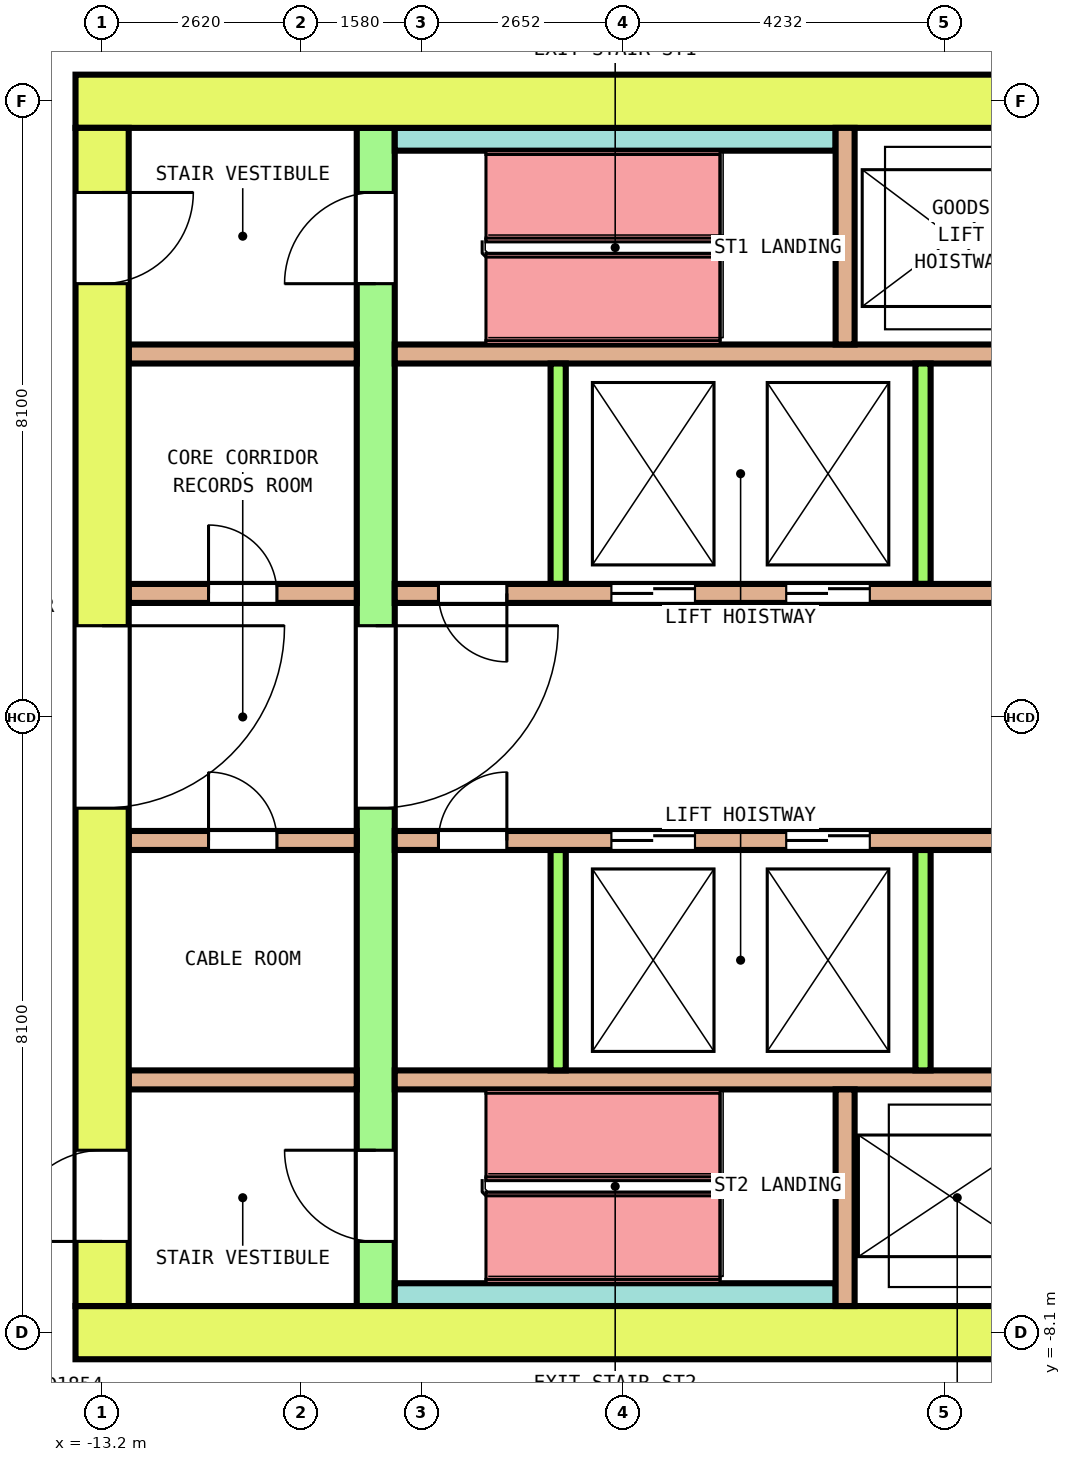
"""IFC4 building model, lengths in metres.
Left out: names, types, materials, properties, quantities, classifications, styles, units other than length and angle.
Written with IfcOpenShell. Run it as: python <this file> out.ifc"""

import sys

from ifc_helpers import new_model, si_unit, direction, frame, frame_2d, origin, place, context, subcontext, project, spatial, rectangle, extrude, element, fill, save


model = new_model("IFC4")
c1 = context("Model", 3, precision=1e-05, world=origin(), true_north=direction((0.0, 1.0)))
c2 = subcontext(c1, "Body", "Model", "MODEL_VIEW")
j1 = project(units=[si_unit("LENGTHUNIT", "METRE"), si_unit("PLANEANGLEUNIT", "RADIAN")], contexts=[c1])
p1 = place(None, origin())
s1 = spatial("IfcSite", under=j1, at=p1, CompositionType="ELEMENT")
p2 = place(p1, origin())
s2 = spatial("IfcBuilding", under=s1, at=p2, CompositionType="ELEMENT")
p3 = place(p2, frame((0.0, 0.0, 180.4)))
s3 = spatial("IfcBuildingStorey", under=s2, at=p3, CompositionType="ELEMENT", Elevation=180.4)
p4 = place(p3, frame((-13.55, 8.1, 0.0), z_axis=(0.0, 0.0, 1.0), x_axis=(1.0, 0.0, 0.0)))
e1 = element("IfcWall", 1, at=p4, inside=s3, PredefinedType="SHEAR", context=c2, shape_type="SweptSolid", body=[
    extrude(rectangle(XDim=27.1, YDim=0.7, at=frame_2d((13.55, 0.0))), origin(), (0.0, 0.0, 1.0), 4.1),
])
p5 = place(p4, frame((14.475, 0.0, 0.0)))
e2 = element("IfcOpeningElement", 2, at=p5, cuts=e1, PredefinedType="OPENING", context=c2, shape_type="SweptSolid", body=[
    extrude(rectangle(XDim=1.4, YDim=2.1, at=frame_2d((0.7, 1.05))), frame((0.0, 0.36, 0.0), z_axis=(0.0, -1.0, 0.0), x_axis=(1.0, 0.0, 0.0)), (0.0, 0.0, 1.0), 0.72),
])
p6 = place(p3, frame((-13.55, -8.1, 0.0), z_axis=(0.0, 0.0, 1.0), x_axis=(1.0, 0.0, 0.0)))
e3 = element("IfcWall", 3, at=p6, inside=s3, PredefinedType="SHEAR", context=c2, shape_type="SweptSolid", body=[
    extrude(rectangle(XDim=27.1, YDim=0.7, at=frame_2d((13.55, 0.0))), origin(), (0.0, 0.0, 1.0), 4.1),
])
p7 = place(p6, frame((15.1, 0.0, 0.0)))
e4 = element("IfcOpeningElement", 4, at=p7, cuts=e3, PredefinedType="OPENING", context=c2, shape_type="SweptSolid", body=[
    extrude(rectangle(XDim=1.2, YDim=2.1, at=frame_2d((0.6, 1.05))), frame((0.0, 0.36, 0.0), z_axis=(0.0, -1.0, 0.0), x_axis=(1.0, 0.0, 0.0)), (0.0, 0.0, 1.0), 0.72),
])
p8 = place(p3, frame((-13.2, -7.75, 0.0), z_axis=(0.0, 0.0, 1.0), x_axis=(0.0, 1.0, 0.0)))
e5 = element("IfcWall", 5, at=p8, inside=s3, PredefinedType="SHEAR", context=c2, shape_type="SweptSolid", body=[
    extrude(rectangle(XDim=15.5, YDim=0.7, at=frame_2d((7.75, 0.0))), origin(), (0.0, 0.0, 1.0), 4.1),
])
p9 = place(p8, frame((6.55, 0.0, 0.0)))
e6 = element("IfcOpeningElement", 6, at=p9, cuts=e5, PredefinedType="OPENING", context=c2, shape_type="SweptSolid", body=[
    extrude(rectangle(XDim=2.4, YDim=2.1, at=frame_2d((1.2, 1.05))), frame((0.0, 0.36, 0.0), z_axis=(0.0, -1.0, 0.0), x_axis=(1.0, 0.0, 0.0)), (0.0, 0.0, 1.0), 0.72),
])
p10 = place(p8, frame((13.45, 0.0, 0.0)))
e7 = element("IfcOpeningElement", 7, at=p10, cuts=e5, PredefinedType="OPENING", context=c2, shape_type="SweptSolid", body=[
    extrude(rectangle(XDim=1.2, YDim=2.1, at=frame_2d((0.6, 1.05))), frame((0.0, 0.36, 0.0), z_axis=(0.0, -1.0, 0.0), x_axis=(1.0, 0.0, 0.0)), (0.0, 0.0, 1.0), 0.72),
])
p11 = place(p8, frame((0.85, 0.0, 0.0)))
e8 = element("IfcOpeningElement", 8, at=p11, cuts=e5, PredefinedType="OPENING", context=c2, shape_type="SweptSolid", body=[
    extrude(rectangle(XDim=1.2, YDim=2.1, at=frame_2d((0.6, 1.05))), frame((0.0, 0.36, 0.0), z_axis=(0.0, -1.0, 0.0), x_axis=(1.0, 0.0, 0.0)), (0.0, 0.0, 1.0), 0.72),
])
p12 = place(p3, frame((-9.6, -7.75, 0.0), z_axis=(0.0, 0.0, 1.0), x_axis=(0.0, 1.0, 0.0)))
e9 = element("IfcWall", 9, at=p12, inside=s3, PredefinedType="SHEAR", context=c2, shape_type="SweptSolid", body=[
    extrude(rectangle(XDim=15.5, YDim=0.5, at=frame_2d((7.75, 0.0))), origin(), (0.0, 0.0, 1.0), 4.1),
])
p13 = place(p12, frame((6.55, 0.0, 0.0)))
e10 = element("IfcOpeningElement", 10, at=p13, cuts=e9, PredefinedType="OPENING", context=c2, shape_type="SweptSolid", body=[
    extrude(rectangle(XDim=2.4, YDim=2.1, at=frame_2d((1.2, 1.05))), frame((0.0, 0.26, 0.0), z_axis=(0.0, -1.0, 0.0), x_axis=(1.0, 0.0, 0.0)), (0.0, 0.0, 1.0), 0.52),
])
p14 = place(p12, frame((13.45, 0.0, 0.0)))
e11 = element("IfcOpeningElement", 11, at=p14, cuts=e9, PredefinedType="OPENING", context=c2, shape_type="SweptSolid", body=[
    extrude(rectangle(XDim=1.2, YDim=2.1, at=frame_2d((0.6, 1.05))), frame((0.0, 0.26, 0.0), z_axis=(0.0, -1.0, 0.0), x_axis=(1.0, 0.0, 0.0)), (0.0, 0.0, 1.0), 0.52),
])
p15 = place(p12, frame((0.85, 0.0, 0.0)))
e12 = element("IfcOpeningElement", 12, at=p15, cuts=e9, PredefinedType="OPENING", context=c2, shape_type="SweptSolid", body=[
    extrude(rectangle(XDim=1.2, YDim=2.1, at=frame_2d((0.6, 1.05))), frame((0.0, 0.26, 0.0), z_axis=(0.0, -1.0, 0.0), x_axis=(1.0, 0.0, 0.0)), (0.0, 0.0, 1.0), 0.52),
])
p16 = place(p3, frame((-12.85, 1.625, 0.0), z_axis=(0.0, 0.0, 1.0), x_axis=(1.0, 0.0, 0.0)))
e13 = element("IfcWall", 13, at=p16, inside=s3, PredefinedType="SOLIDWALL", context=c2, shape_type="SweptSolid", body=[
    extrude(rectangle(XDim=3.0, YDim=0.25, at=frame_2d((1.5, 0.0))), origin(), (0.0, 0.0, 1.0), 4.1),
])
p17 = place(p16, frame((1.05, 0.0, 0.0)))
e14 = element("IfcOpeningElement", 14, at=p17, cuts=e13, PredefinedType="OPENING", context=c2, shape_type="SweptSolid", body=[
    extrude(rectangle(XDim=0.9, YDim=2.1, at=frame_2d((0.45, 1.05))), frame((0.0, 0.135, 0.0), z_axis=(0.0, -1.0, 0.0), x_axis=(1.0, 0.0, 0.0)), (0.0, 0.0, 1.0), 0.27),
])
p18 = place(p3, frame((-9.35, 1.625, 0.0), z_axis=(0.0, 0.0, 1.0), x_axis=(1.0, 0.0, 0.0)))
e15 = element("IfcWall", 15, at=p18, inside=s3, PredefinedType="SOLIDWALL", context=c2, shape_type="SweptSolid", body=[
    extrude(rectangle(XDim=18.7, YDim=0.25, at=frame_2d((9.35, 0.0))), origin(), (0.0, 0.0, 1.0), 4.1),
])
p19 = place(p18, frame((2.85, 0.0, 0.0)))
e16 = element("IfcOpeningElement", 16, at=p19, cuts=e15, PredefinedType="OPENING", context=c2, shape_type="SweptSolid", body=[
    extrude(rectangle(XDim=1.1, YDim=2.1, at=frame_2d((0.55, 1.05))), frame((0.0, 0.135, 0.0), z_axis=(0.0, -1.0, 0.0), x_axis=(1.0, 0.0, 0.0)), (0.0, 0.0, 1.0), 0.27),
])
p20 = place(p18, frame((5.15, 0.0, 0.0)))
e17 = element("IfcOpeningElement", 17, at=p20, cuts=e15, PredefinedType="OPENING", context=c2, shape_type="SweptSolid", body=[
    extrude(rectangle(XDim=1.1, YDim=2.1, at=frame_2d((0.55, 1.05))), frame((0.0, 0.135, 0.0), z_axis=(0.0, -1.0, 0.0), x_axis=(1.0, 0.0, 0.0)), (0.0, 0.0, 1.0), 0.27),
])
p21 = place(p18, frame((14.8, 0.0, 0.0)))
e18 = element("IfcOpeningElement", 18, at=p21, cuts=e15, PredefinedType="OPENING", context=c2, shape_type="SweptSolid", body=[
    extrude(rectangle(XDim=1.1, YDim=2.1, at=frame_2d((0.55, 1.05))), frame((0.0, 0.135, 0.0), z_axis=(0.0, -1.0, 0.0), x_axis=(1.0, 0.0, 0.0)), (0.0, 0.0, 1.0), 0.27),
])
p22 = place(p18, frame((0.575, 0.0, 0.0)))
e19 = element("IfcOpeningElement", 19, at=p22, cuts=e15, PredefinedType="OPENING", context=c2, shape_type="SweptSolid", body=[
    extrude(rectangle(XDim=0.9, YDim=2.1, at=frame_2d((0.45, 1.05))), frame((0.0, 0.135, 0.0), z_axis=(0.0, -1.0, 0.0), x_axis=(1.0, 0.0, 0.0)), (0.0, 0.0, 1.0), 0.27),
])
p23 = place(p18, frame((17.225, 0.0, 0.0)))
e20 = element("IfcOpeningElement", 20, at=p23, cuts=e15, PredefinedType="OPENING", context=c2, shape_type="SweptSolid", body=[
    extrude(rectangle(XDim=0.9, YDim=2.1, at=frame_2d((0.45, 1.05))), frame((0.0, 0.135, 0.0), z_axis=(0.0, -1.0, 0.0), x_axis=(1.0, 0.0, 0.0)), (0.0, 0.0, 1.0), 0.27),
])
p24 = place(p3, frame((-12.85, 4.775, 0.0), z_axis=(0.0, 0.0, 1.0), x_axis=(1.0, 0.0, 0.0)))
e21 = element("IfcWall", 21, at=p24, inside=s3, PredefinedType="SOLIDWALL", context=c2, shape_type="SweptSolid", body=[
    extrude(rectangle(XDim=3.0, YDim=0.25, at=frame_2d((1.5, 0.0))), origin(), (0.0, 0.0, 1.0), 4.1),
])
p25 = place(p3, frame((-9.35, 4.775, 0.0), z_axis=(0.0, 0.0, 1.0), x_axis=(1.0, 0.0, 0.0)))
e22 = element("IfcWall", 22, at=p25, inside=s3, PredefinedType="SOLIDWALL", context=c2, shape_type="SweptSolid", body=[
    extrude(rectangle(XDim=18.7, YDim=0.25, at=frame_2d((9.35, 0.0))), origin(), (0.0, 0.0, 1.0), 4.1),
])
for number, where, z_axis, x_axis in (
    (23, (-7.2, 1.75, 0.0), (0.0, 0.0, 1.0), (0.0, 1.0, 0.0)),
    (24, (-2.4, 1.75, 0.0), (0.0, 0.0, 1.0), (0.0, 1.0, 0.0)),
):
    element("IfcWall", number, at=place(p3, frame(where, z_axis=z_axis, x_axis=x_axis)), inside=s3, PredefinedType="SOLIDWALL", context=c2, shape_type="SweptSolid", body=[
        extrude(rectangle(XDim=2.9, YDim=0.2, at=frame_2d((1.45, 0.0))), origin(), (0.0, 0.0, 1.0), 4.1),
    ])
p26 = place(p3, frame((-12.85, -1.625, 0.0), z_axis=(0.0, 0.0, 1.0), x_axis=(1.0, 0.0, 0.0)))
e25 = element("IfcWall", 25, at=p26, inside=s3, PredefinedType="SOLIDWALL", context=c2, shape_type="SweptSolid", body=[
    extrude(rectangle(XDim=3.0, YDim=0.25, at=frame_2d((1.5, 0.0))), origin(), (0.0, 0.0, 1.0), 4.1),
])
p27 = place(p26, frame((1.05, 0.0, 0.0)))
e26 = element("IfcOpeningElement", 26, at=p27, cuts=e25, PredefinedType="OPENING", context=c2, shape_type="SweptSolid", body=[
    extrude(rectangle(XDim=0.9, YDim=2.1, at=frame_2d((0.45, 1.05))), frame((0.0, 0.135, 0.0), z_axis=(0.0, -1.0, 0.0), x_axis=(1.0, 0.0, 0.0)), (0.0, 0.0, 1.0), 0.27),
])
p28 = place(p3, frame((-9.35, -1.625, 0.0), z_axis=(0.0, 0.0, 1.0), x_axis=(1.0, 0.0, 0.0)))
e27 = element("IfcWall", 27, at=p28, inside=s3, PredefinedType="SOLIDWALL", context=c2, shape_type="SweptSolid", body=[
    extrude(rectangle(XDim=18.7, YDim=0.25, at=frame_2d((9.35, 0.0))), origin(), (0.0, 0.0, 1.0), 4.1),
])
p29 = place(p28, frame((2.85, 0.0, 0.0)))
e28 = element("IfcOpeningElement", 28, at=p29, cuts=e27, PredefinedType="OPENING", context=c2, shape_type="SweptSolid", body=[
    extrude(rectangle(XDim=1.1, YDim=2.1, at=frame_2d((0.55, 1.05))), frame((0.0, 0.135, 0.0), z_axis=(0.0, -1.0, 0.0), x_axis=(1.0, 0.0, 0.0)), (0.0, 0.0, 1.0), 0.27),
])
p30 = place(p28, frame((5.15, 0.0, 0.0)))
e29 = element("IfcOpeningElement", 29, at=p30, cuts=e27, PredefinedType="OPENING", context=c2, shape_type="SweptSolid", body=[
    extrude(rectangle(XDim=1.1, YDim=2.1, at=frame_2d((0.55, 1.05))), frame((0.0, 0.135, 0.0), z_axis=(0.0, -1.0, 0.0), x_axis=(1.0, 0.0, 0.0)), (0.0, 0.0, 1.0), 0.27),
])
p31 = place(p28, frame((14.8, 0.0, 0.0)))
e30 = element("IfcOpeningElement", 30, at=p31, cuts=e27, PredefinedType="OPENING", context=c2, shape_type="SweptSolid", body=[
    extrude(rectangle(XDim=1.1, YDim=2.1, at=frame_2d((0.55, 1.05))), frame((0.0, 0.135, 0.0), z_axis=(0.0, -1.0, 0.0), x_axis=(1.0, 0.0, 0.0)), (0.0, 0.0, 1.0), 0.27),
])
p32 = place(p28, frame((0.575, 0.0, 0.0)))
e31 = element("IfcOpeningElement", 31, at=p32, cuts=e27, PredefinedType="OPENING", context=c2, shape_type="SweptSolid", body=[
    extrude(rectangle(XDim=0.9, YDim=2.1, at=frame_2d((0.45, 1.05))), frame((0.0, 0.135, 0.0), z_axis=(0.0, -1.0, 0.0), x_axis=(1.0, 0.0, 0.0)), (0.0, 0.0, 1.0), 0.27),
])
p33 = place(p28, frame((17.225, 0.0, 0.0)))
e32 = element("IfcOpeningElement", 32, at=p33, cuts=e27, PredefinedType="OPENING", context=c2, shape_type="SweptSolid", body=[
    extrude(rectangle(XDim=0.9, YDim=2.1, at=frame_2d((0.45, 1.05))), frame((0.0, 0.135, 0.0), z_axis=(0.0, -1.0, 0.0), x_axis=(1.0, 0.0, 0.0)), (0.0, 0.0, 1.0), 0.27),
])
p34 = place(p3, frame((-12.85, -4.775, 0.0), z_axis=(0.0, 0.0, 1.0), x_axis=(1.0, 0.0, 0.0)))
e33 = element("IfcWall", 33, at=p34, inside=s3, PredefinedType="SOLIDWALL", context=c2, shape_type="SweptSolid", body=[
    extrude(rectangle(XDim=3.0, YDim=0.25, at=frame_2d((1.5, 0.0))), origin(), (0.0, 0.0, 1.0), 4.1),
])
p35 = place(p3, frame((-9.35, -4.775, 0.0), z_axis=(0.0, 0.0, 1.0), x_axis=(1.0, 0.0, 0.0)))
e34 = element("IfcWall", 34, at=p35, inside=s3, PredefinedType="SOLIDWALL", context=c2, shape_type="SweptSolid", body=[
    extrude(rectangle(XDim=18.7, YDim=0.25, at=frame_2d((9.35, 0.0))), origin(), (0.0, 0.0, 1.0), 4.1),
])
for number, where, z_axis, x_axis in (
    (35, (-7.2, -4.65, 0.0), (0.0, 0.0, 1.0), (0.0, 1.0, 0.0)),
    (36, (-2.4, -4.65, 0.0), (0.0, 0.0, 1.0), (0.0, 1.0, 0.0)),
):
    element("IfcWall", number, at=place(p3, frame(where, z_axis=z_axis, x_axis=x_axis)), inside=s3, PredefinedType="SOLIDWALL", context=c2, shape_type="SweptSolid", body=[
        extrude(rectangle(XDim=2.9, YDim=0.2, at=frame_2d((1.45, 0.0))), origin(), (0.0, 0.0, 1.0), 4.1),
    ])
p36 = place(p3, frame((-9.35, 7.6, 0.0), z_axis=(0.0, 0.0, 1.0), x_axis=(1.0, 0.0, 0.0)))
e37 = element("IfcWall", 37, at=p36, inside=s3, PredefinedType="SOLIDWALL", context=c2, shape_type="SweptSolid", body=[
    extrude(rectangle(XDim=5.8, YDim=0.3, at=frame_2d((2.9, 0.0))), origin(), (0.0, 0.0, 1.0), 4.1),
])
p37 = place(p3, frame((-3.425, 4.9, 0.0), z_axis=(0.0, 0.0, 1.0), x_axis=(0.0, 1.0, 0.0)))
e38 = element("IfcWall", 38, at=p37, inside=s3, PredefinedType="SOLIDWALL", context=c2, shape_type="SweptSolid", body=[
    extrude(rectangle(XDim=2.85, YDim=0.25, at=frame_2d((1.425, 0.0))), origin(), (0.0, 0.0, 1.0), 4.1),
])
p38 = place(p3, frame((-9.35, -7.6, 0.0), z_axis=(0.0, 0.0, 1.0), x_axis=(1.0, 0.0, 0.0)))
e39 = element("IfcWall", 39, at=p38, inside=s3, PredefinedType="SOLIDWALL", context=c2, shape_type="SweptSolid", body=[
    extrude(rectangle(XDim=5.8, YDim=0.3, at=frame_2d((2.9, 0.0))), origin(), (0.0, 0.0, 1.0), 4.1),
])
p39 = place(p3, frame((-3.425, -7.75, 0.0), z_axis=(0.0, 0.0, 1.0), x_axis=(0.0, 1.0, 0.0)))
e40 = element("IfcWall", 40, at=p39, inside=s3, PredefinedType="SOLIDWALL", context=c2, shape_type="SweptSolid", body=[
    extrude(rectangle(XDim=2.85, YDim=0.25, at=frame_2d((1.425, 0.0))), origin(), (0.0, 0.0, 1.0), 4.1),
])
p40 = place(p19, origin())
e41 = element("IfcDoor", 41, at=p40, inside=s3, OperationType="DOUBLE_DOOR_SLIDING", PredefinedType="DOOR", context=c2, shape_type="SweptSolid", body=[
    extrude(rectangle(XDim=1.1, YDim=2.1, at=frame_2d((0.55, 1.05))), frame((0.0, 0.075, 0.0), z_axis=(0.0, -1.0, 0.0), x_axis=(1.0, 0.0, 0.0)), (0.0, 0.0, 1.0), 0.15),
])
fill(e16, e41)
p41 = place(p20, origin())
e42 = element("IfcDoor", 42, at=p41, inside=s3, OperationType="DOUBLE_DOOR_SLIDING", PredefinedType="DOOR", context=c2, shape_type="SweptSolid", body=[
    extrude(rectangle(XDim=1.1, YDim=2.1, at=frame_2d((0.55, 1.05))), frame((0.0, 0.075, 0.0), z_axis=(0.0, -1.0, 0.0), x_axis=(1.0, 0.0, 0.0)), (0.0, 0.0, 1.0), 0.15),
])
fill(e17, e42)
p42 = place(p29, origin())
e43 = element("IfcDoor", 43, at=p42, inside=s3, OperationType="DOUBLE_DOOR_SLIDING", PredefinedType="DOOR", context=c2, shape_type="SweptSolid", body=[
    extrude(rectangle(XDim=1.1, YDim=2.1, at=frame_2d((0.55, 1.05))), frame((0.0, 0.075, 0.0), z_axis=(0.0, -1.0, 0.0), x_axis=(1.0, 0.0, 0.0)), (0.0, 0.0, 1.0), 0.15),
])
fill(e28, e43)
p43 = place(p30, origin())
e44 = element("IfcDoor", 44, at=p43, inside=s3, OperationType="DOUBLE_DOOR_SLIDING", PredefinedType="DOOR", context=c2, shape_type="SweptSolid", body=[
    extrude(rectangle(XDim=1.1, YDim=2.1, at=frame_2d((0.55, 1.05))), frame((0.0, 0.075, 0.0), z_axis=(0.0, -1.0, 0.0), x_axis=(1.0, 0.0, 0.0)), (0.0, 0.0, 1.0), 0.15),
])
fill(e29, e44)
p44 = place(p13, origin())
e45 = element("IfcDoor", 45, at=p44, inside=s3, OperationType="DOUBLE_DOOR_SINGLE_SWING", PredefinedType="DOOR", context=c2, shape_type="SweptSolid", body=[
    extrude(rectangle(XDim=2.4, YDim=2.1, at=frame_2d((1.2, 1.05))), frame((0.0, 0.2, 0.0), z_axis=(0.0, -1.0, 0.0), x_axis=(1.0, 0.0, 0.0)), (0.0, 0.0, 1.0), 0.4),
])
fill(e10, e45)
p45 = place(p9, origin())
e46 = element("IfcDoor", 46, at=p45, inside=s3, OperationType="DOUBLE_DOOR_SINGLE_SWING", PredefinedType="DOOR", context=c2, shape_type="SweptSolid", body=[
    extrude(rectangle(XDim=2.4, YDim=2.1, at=frame_2d((1.2, 1.05))), frame((0.0, 0.3, 0.0), z_axis=(0.0, -1.0, 0.0), x_axis=(1.0, 0.0, 0.0)), (0.0, 0.0, 1.0), 0.6),
])
fill(e6, e46)
p46 = place(p14, origin())
e47 = element("IfcDoor", 47, at=p46, inside=s3, OperationType="SINGLE_SWING_LEFT", PredefinedType="DOOR", context=c2, shape_type="SweptSolid", body=[
    extrude(rectangle(XDim=1.2, YDim=2.1, at=frame_2d((0.6, 1.05))), frame((0.0, 0.2, 0.0), z_axis=(0.0, -1.0, 0.0), x_axis=(1.0, 0.0, 0.0)), (0.0, 0.0, 1.0), 0.4),
])
fill(e11, e47)
p47 = place(p10, origin())
e48 = element("IfcDoor", 48, at=p47, inside=s3, OperationType="SINGLE_SWING_RIGHT", PredefinedType="DOOR", context=c2, shape_type="SweptSolid", body=[
    extrude(rectangle(XDim=1.2, YDim=2.1, at=frame_2d((0.6, 1.05))), frame((0.0, 0.3, 0.0), z_axis=(0.0, -1.0, 0.0), x_axis=(1.0, 0.0, 0.0)), (0.0, 0.0, 1.0), 0.6),
])
fill(e7, e48)
p48 = place(p15, origin())
e49 = element("IfcDoor", 49, at=p48, inside=s3, OperationType="SINGLE_SWING_LEFT", PredefinedType="DOOR", context=c2, shape_type="SweptSolid", body=[
    extrude(rectangle(XDim=1.2, YDim=2.1, at=frame_2d((0.6, 1.05))), frame((0.0, 0.2, 0.0), z_axis=(0.0, -1.0, 0.0), x_axis=(1.0, 0.0, 0.0)), (0.0, 0.0, 1.0), 0.4),
])
fill(e12, e49)
p49 = place(p11, origin())
e50 = element("IfcDoor", 50, at=p49, inside=s3, OperationType="SINGLE_SWING_RIGHT", PredefinedType="DOOR", context=c2, shape_type="SweptSolid", body=[
    extrude(rectangle(XDim=1.2, YDim=2.1, at=frame_2d((0.6, 1.05))), frame((0.0, 0.3, 0.0), z_axis=(0.0, -1.0, 0.0), x_axis=(1.0, 0.0, 0.0)), (0.0, 0.0, 1.0), 0.6),
])
fill(e8, e50)
p50 = place(p17, origin())
e51 = element("IfcDoor", 51, at=p50, inside=s3, OperationType="SINGLE_SWING_LEFT", PredefinedType="DOOR", context=c2, shape_type="SweptSolid", body=[
    extrude(rectangle(XDim=0.9, YDim=2.1, at=frame_2d((0.45, 1.05))), frame((0.0, 0.075, 0.0), z_axis=(0.0, -1.0, 0.0), x_axis=(1.0, 0.0, 0.0)), (0.0, 0.0, 1.0), 0.15),
])
fill(e14, e51)
p51 = place(p22, origin())
e52 = element("IfcDoor", 52, at=p51, inside=s3, OperationType="SINGLE_SWING_RIGHT", PredefinedType="DOOR", context=c2, shape_type="SweptSolid", body=[
    extrude(rectangle(XDim=0.9, YDim=2.1, at=frame_2d((0.45, 1.05))), frame((0.0, 0.075, 0.0), z_axis=(0.0, -1.0, 0.0), x_axis=(1.0, 0.0, 0.0)), (0.0, 0.0, 1.0), 0.15),
])
fill(e19, e52)
p52 = place(p27, origin())
e53 = element("IfcDoor", 53, at=p52, inside=s3, OperationType="SINGLE_SWING_LEFT", PredefinedType="DOOR", context=c2, shape_type="SweptSolid", body=[
    extrude(rectangle(XDim=0.9, YDim=2.1, at=frame_2d((0.45, 1.05))), frame((0.0, 0.075, 0.0), z_axis=(0.0, -1.0, 0.0), x_axis=(1.0, 0.0, 0.0)), (0.0, 0.0, 1.0), 0.15),
])
fill(e26, e53)
p53 = place(p32, origin())
e54 = element("IfcDoor", 54, at=p53, inside=s3, OperationType="SINGLE_SWING_RIGHT", PredefinedType="DOOR", context=c2, shape_type="SweptSolid", body=[
    extrude(rectangle(XDim=0.9, YDim=2.1, at=frame_2d((0.45, 1.05))), frame((0.0, 0.075, 0.0), z_axis=(0.0, -1.0, 0.0), x_axis=(1.0, 0.0, 0.0)), (0.0, 0.0, 1.0), 0.15),
])
fill(e31, e54)
save(model, sys.argv[1])
